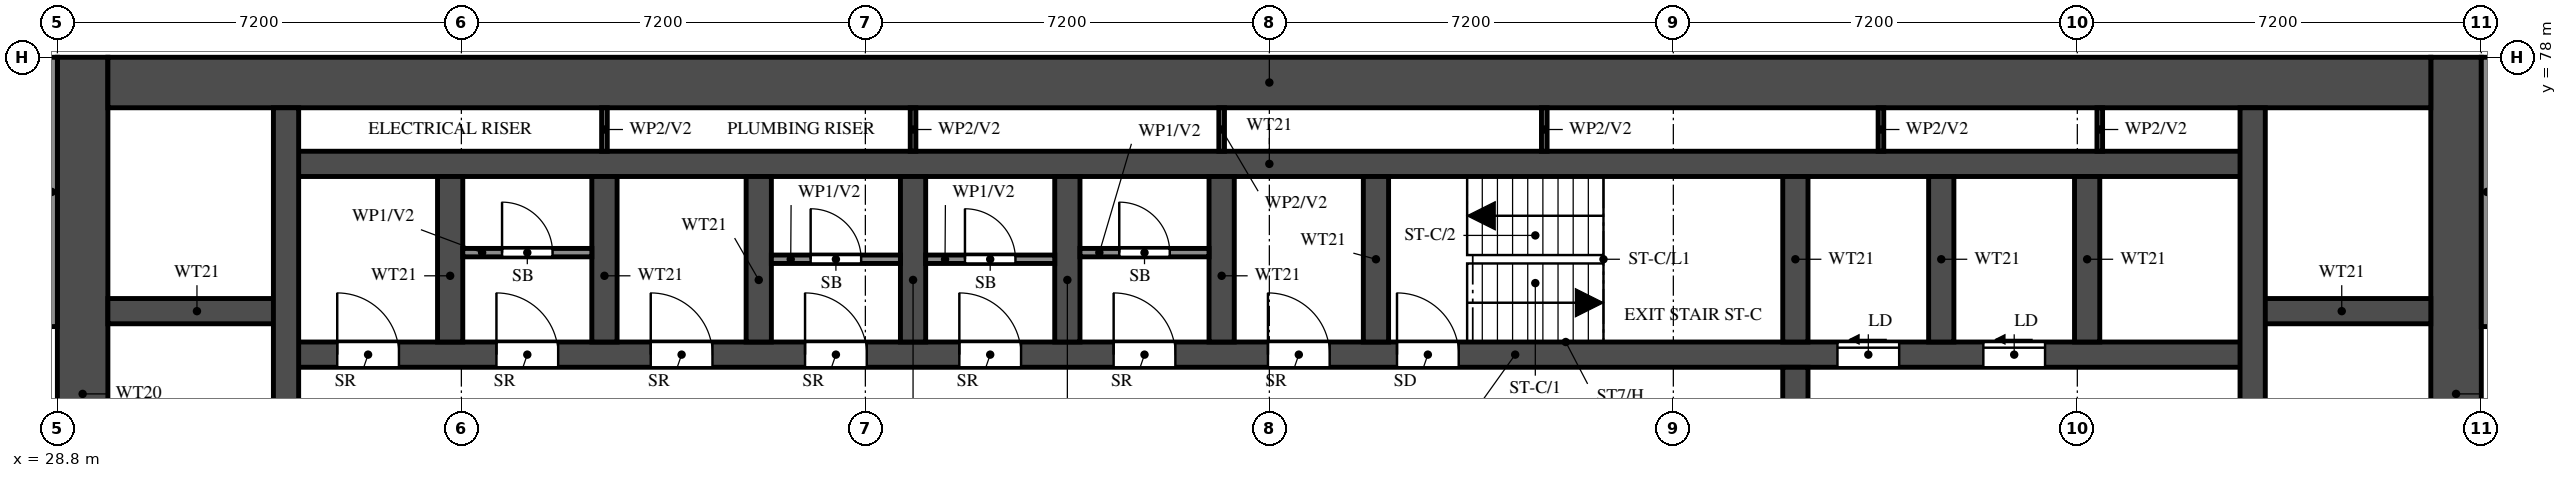
"""IFC4 building model, lengths in metres.
Left out: names, types, materials, properties, quantities, classifications, styles, units other than length and angle.
Written with IfcOpenShell. Run it as: python <this file> out.ifc"""

import sys

from ifc_helpers import new_model, si_unit, direction, frame, frame_2d, origin, place, context, subcontext, project, spatial, rectangle, extrude, element, fill, save


model = new_model("IFC4")
c1 = context("Model", 3, precision=1e-05, world=origin(), true_north=direction((0.0, 1.0)))
c2 = subcontext(c1, "Body", "Model", "MODEL_VIEW")
j1 = project(units=[si_unit("LENGTHUNIT", "METRE"), si_unit("PLANEANGLEUNIT", "RADIAN")], contexts=[c1])
p1 = place(None, origin())
s1 = spatial("IfcSite", under=j1, at=p1, CompositionType="ELEMENT")
p2 = place(p1, origin())
s2 = spatial("IfcBuilding", under=s1, at=p2, CompositionType="ELEMENT")
p3 = place(p2, frame((0.0, 0.0, 34.0)))
s3 = spatial("IfcBuildingStorey", under=s2, at=p3, CompositionType="ELEMENT", Elevation=34.0)
for number, where, z_axis, x_axis in (
    (1, (29.25, 66.0, 0.0), (0.0, 0.0, 1.0), (0.0, 1.0, 0.0)),
    (2, (71.55, 66.0, 0.0), (0.0, 0.0, 1.0), (0.0, 1.0, 0.0)),
):
    element("IfcWall", number, at=place(p3, frame(where, z_axis=z_axis, x_axis=x_axis)), inside=s3, PredefinedType="SHEAR", context=c2, shape_type="SweptSolid", body=[
        extrude(rectangle(XDim=12.0, YDim=0.9, at=frame_2d((6.0, 0.0))), origin(), (0.0, 0.0, 1.0), 3.18),
    ])
p4 = place(p3, frame((29.7, 77.55, 0.0), z_axis=(0.0, 0.0, 1.0), x_axis=(1.0, 0.0, 0.0)))
e3 = element("IfcWall", 3, at=p4, inside=s3, PredefinedType="SHEAR", context=c2, shape_type="SweptSolid", body=[
    extrude(rectangle(XDim=41.4, YDim=0.9, at=frame_2d((20.7, 0.0))), origin(), (0.0, 0.0, 1.0), 3.18),
])
p5 = place(p3, frame((32.875, 72.7, 0.0), z_axis=(0.0, 0.0, 1.0), x_axis=(1.0, 0.0, 0.0)))
e4 = element("IfcWall", 4, at=p5, inside=s3, PredefinedType="SHEAR", context=c2, shape_type="SweptSolid", body=[
    extrude(rectangle(XDim=35.05, YDim=0.45, at=frame_2d((17.525, 0.0))), origin(), (0.0, 0.0, 1.0), 3.18),
])
p6 = place(p5, frame((19.8, 0.0, 0.0)))
e5 = element("IfcOpeningElement", 5, at=p6, cuts=e4, PredefinedType="OPENING", context=c2, shape_type="SweptSolid", body=[
    extrude(rectangle(XDim=1.1, YDim=2.1, at=frame_2d((0.55, 1.05))), frame((0.0, 0.235, 0.0), z_axis=(0.0, -1.0, 0.0), x_axis=(1.0, 0.0, 0.0)), (0.0, 0.0, 1.0), 0.47),
])
p7 = place(p5, frame((27.65, 0.0, 0.0)))
e6 = element("IfcOpeningElement", 6, at=p7, cuts=e4, PredefinedType="OPENING", context=c2, shape_type="SweptSolid", body=[
    extrude(rectangle(XDim=1.1, YDim=2.1, at=frame_2d((0.55, 1.05))), frame((0.0, 0.235, 0.0), z_axis=(0.0, -1.0, 0.0), x_axis=(1.0, 0.0, 0.0)), (0.0, 0.0, 1.0), 0.47),
])
p8 = place(p5, frame((30.25, 0.0, 0.0)))
e7 = element("IfcOpeningElement", 7, at=p8, cuts=e4, PredefinedType="OPENING", context=c2, shape_type="SweptSolid", body=[
    extrude(rectangle(XDim=1.1, YDim=2.1, at=frame_2d((0.55, 1.05))), frame((0.0, 0.235, 0.0), z_axis=(0.0, -1.0, 0.0), x_axis=(1.0, 0.0, 0.0)), (0.0, 0.0, 1.0), 0.47),
])
p9 = place(p5, frame((3.75, 0.0, 0.0)))
e8 = element("IfcOpeningElement", 8, at=p9, cuts=e4, PredefinedType="OPENING", context=c2, shape_type="SweptSolid", body=[
    extrude(rectangle(XDim=1.1, YDim=2.1, at=frame_2d((0.55, 1.05))), frame((0.0, 0.235, 0.0), z_axis=(0.0, -1.0, 0.0), x_axis=(1.0, 0.0, 0.0)), (0.0, 0.0, 1.0), 0.47),
])
p10 = place(p5, frame((6.5, 0.0, 0.0)))
e9 = element("IfcOpeningElement", 9, at=p10, cuts=e4, PredefinedType="OPENING", context=c2, shape_type="SweptSolid", body=[
    extrude(rectangle(XDim=1.1, YDim=2.1, at=frame_2d((0.55, 1.05))), frame((0.0, 0.235, 0.0), z_axis=(0.0, -1.0, 0.0), x_axis=(1.0, 0.0, 0.0)), (0.0, 0.0, 1.0), 0.47),
])
p11 = place(p5, frame((9.25, 0.0, 0.0)))
e10 = element("IfcOpeningElement", 10, at=p11, cuts=e4, PredefinedType="OPENING", context=c2, shape_type="SweptSolid", body=[
    extrude(rectangle(XDim=1.1, YDim=2.1, at=frame_2d((0.55, 1.05))), frame((0.0, 0.235, 0.0), z_axis=(0.0, -1.0, 0.0), x_axis=(1.0, 0.0, 0.0)), (0.0, 0.0, 1.0), 0.47),
])
p12 = place(p5, frame((12.0, 0.0, 0.0)))
e11 = element("IfcOpeningElement", 11, at=p12, cuts=e4, PredefinedType="OPENING", context=c2, shape_type="SweptSolid", body=[
    extrude(rectangle(XDim=1.1, YDim=2.1, at=frame_2d((0.55, 1.05))), frame((0.0, 0.235, 0.0), z_axis=(0.0, -1.0, 0.0), x_axis=(1.0, 0.0, 0.0)), (0.0, 0.0, 1.0), 0.47),
])
p13 = place(p5, frame((14.75, 0.0, 0.0)))
e12 = element("IfcOpeningElement", 12, at=p13, cuts=e4, PredefinedType="OPENING", context=c2, shape_type="SweptSolid", body=[
    extrude(rectangle(XDim=1.1, YDim=2.1, at=frame_2d((0.55, 1.05))), frame((0.0, 0.235, 0.0), z_axis=(0.0, -1.0, 0.0), x_axis=(1.0, 0.0, 0.0)), (0.0, 0.0, 1.0), 0.47),
])
p14 = place(p5, frame((17.5, 0.0, 0.0)))
e13 = element("IfcOpeningElement", 13, at=p14, cuts=e4, PredefinedType="OPENING", context=c2, shape_type="SweptSolid", body=[
    extrude(rectangle(XDim=1.1, YDim=2.1, at=frame_2d((0.55, 1.05))), frame((0.0, 0.235, 0.0), z_axis=(0.0, -1.0, 0.0), x_axis=(1.0, 0.0, 0.0)), (0.0, 0.0, 1.0), 0.47),
])
p15 = place(p5, frame((0.913, 0.0, 0.0)))
e14 = element("IfcOpeningElement", 14, at=p15, cuts=e4, PredefinedType="OPENING", context=c2, shape_type="SweptSolid", body=[
    extrude(rectangle(XDim=1.1, YDim=2.1, at=frame_2d((0.55, 1.05))), frame((0.0, 0.235, 0.0), z_axis=(0.0, -1.0, 0.0), x_axis=(1.0, 0.0, 0.0)), (0.0, 0.0, 1.0), 0.47),
])
p16 = place(p3, frame((32.875, 76.1, 0.0), z_axis=(0.0, 0.0, 1.0), x_axis=(1.0, 0.0, 0.0)))
e15 = element("IfcWall", 15, at=p16, inside=s3, PredefinedType="SHEAR", context=c2, shape_type="SweptSolid", body=[
    extrude(rectangle(XDim=35.05, YDim=0.45, at=frame_2d((17.525, 0.0))), origin(), (0.0, 0.0, 1.0), 3.18),
])
for number, where, z_axis, x_axis in (
    (16, (29.7, 73.475, 0.0), (0.0, 0.0, 1.0), (1.0, 0.0, 0.0)),
    (17, (67.925, 73.475, 0.0), (0.0, 0.0, 1.0), (1.0, 0.0, 0.0)),
):
    element("IfcWall", number, at=place(p3, frame(where, z_axis=z_axis, x_axis=x_axis)), inside=s3, PredefinedType="SHEAR", context=c2, shape_type="SweptSolid", body=[
        extrude(rectangle(XDim=3.175, YDim=0.45, at=frame_2d((1.587, 0.0))), origin(), (0.0, 0.0, 1.0), 3.18),
    ])
p17 = place(p3, frame((32.875, 66.45, 0.0), z_axis=(0.0, 0.0, 1.0), x_axis=(0.0, 1.0, 0.0)))
e18 = element("IfcWall", 18, at=p17, inside=s3, PredefinedType="SHEAR", context=c2, shape_type="SweptSolid", body=[
    extrude(rectangle(XDim=10.65, YDim=0.45, at=frame_2d((5.325, 0.0))), origin(), (0.0, 0.0, 1.0), 3.18),
])
p18 = place(p3, frame((67.925, 66.45, 0.0), z_axis=(0.0, 0.0, 1.0), x_axis=(0.0, 1.0, 0.0)))
e19 = element("IfcWall", 19, at=p18, inside=s3, PredefinedType="SHEAR", context=c2, shape_type="SweptSolid", body=[
    extrude(rectangle(XDim=10.65, YDim=0.45, at=frame_2d((5.325, 0.0))), origin(), (0.0, 0.0, 1.0), 3.18),
])
p19 = place(p18, frame((0.15, 0.0, 0.0)))
e20 = element("IfcOpeningElement", 20, at=p19, cuts=e19, PredefinedType="OPENING", context=c2, shape_type="SweptSolid", body=[
    extrude(rectangle(XDim=1.1, YDim=2.1, at=frame_2d((0.55, 1.05))), frame((0.0, 0.235, 0.0), z_axis=(0.0, -1.0, 0.0), x_axis=(1.0, 0.0, 0.0)), (0.0, 0.0, 1.0), 0.47),
])
p20 = place(p3, frame((59.775, 66.45, 0.0), z_axis=(0.0, 0.0, 1.0), x_axis=(0.0, 1.0, 0.0)))
e21 = element("IfcWall", 21, at=p20, inside=s3, PredefinedType="SHEAR", context=c2, shape_type="SweptSolid", body=[
    extrude(rectangle(XDim=6.025, YDim=0.45, at=frame_2d((3.013, 0.0))), origin(), (0.0, 0.0, 1.0), 3.18),
])
p21 = place(p20, frame((3.85, 0.0, 0.0)))
e22 = element("IfcOpeningElement", 22, at=p21, cuts=e21, PredefinedType="OPENING", context=c2, shape_type="SweptSolid", body=[
    extrude(rectangle(XDim=1.2, YDim=2.1, at=frame_2d((0.6, 1.05))), frame((0.0, 0.235, 0.0), z_axis=(0.0, -1.0, 0.0), x_axis=(1.0, 0.0, 0.0)), (0.0, 0.0, 1.0), 0.47),
])
for number, where, z_axis, x_axis in (
    (23, (59.775, 72.925, 0.0), (0.0, 0.0, 1.0), (0.0, 1.0, 0.0)),
    (24, (35.8, 72.925, 0.0), (0.0, 0.0, 1.0), (0.0, 1.0, 0.0)),
    (25, (38.55, 72.925, 0.0), (0.0, 0.0, 1.0), (0.0, 1.0, 0.0)),
    (26, (41.3, 72.925, 0.0), (0.0, 0.0, 1.0), (0.0, 1.0, 0.0)),
    (27, (44.05, 72.925, 0.0), (0.0, 0.0, 1.0), (0.0, 1.0, 0.0)),
    (28, (46.8, 72.925, 0.0), (0.0, 0.0, 1.0), (0.0, 1.0, 0.0)),
    (29, (49.55, 72.925, 0.0), (0.0, 0.0, 1.0), (0.0, 1.0, 0.0)),
    (30, (52.3, 72.925, 0.0), (0.0, 0.0, 1.0), (0.0, 1.0, 0.0)),
    (31, (62.375, 72.925, 0.0), (0.0, 0.0, 1.0), (0.0, 1.0, 0.0)),
    (32, (64.975, 72.925, 0.0), (0.0, 0.0, 1.0), (0.0, 1.0, 0.0)),
):
    element("IfcWall", number, at=place(p3, frame(where, z_axis=z_axis, x_axis=x_axis)), inside=s3, PredefinedType="SHEAR", context=c2, shape_type="SweptSolid", body=[
        extrude(rectangle(XDim=2.95, YDim=0.45, at=frame_2d((1.475, 0.0))), origin(), (0.0, 0.0, 1.0), 3.18),
    ])
p22 = place(p3, frame((36.025, 74.518, 0.0), z_axis=(0.0, 0.0, 1.0), x_axis=(1.0, 0.0, 0.0)))
e33 = element("IfcWall", 33, at=p22, inside=s3, PredefinedType="PARTITIONING", context=c2, shape_type="SweptSolid", body=[
    extrude(rectangle(XDim=2.3, YDim=0.15, at=frame_2d((1.15, 0.0))), origin(), (0.0, 0.0, 1.0), 3.18),
])
p23 = place(p22, frame((0.7, 0.0, 0.0)))
e34 = element("IfcOpeningElement", 34, at=p23, cuts=e33, PredefinedType="OPENING", context=c2, shape_type="SweptSolid", body=[
    extrude(rectangle(XDim=0.9, YDim=2.1, at=frame_2d((0.45, 1.05))), frame((0.0, 0.085, 0.0), z_axis=(0.0, -1.0, 0.0), x_axis=(1.0, 0.0, 0.0)), (0.0, 0.0, 1.0), 0.17),
])
p24 = place(p3, frame((41.525, 74.4, 0.0), z_axis=(0.0, 0.0, 1.0), x_axis=(1.0, 0.0, 0.0)))
e35 = element("IfcWall", 35, at=p24, inside=s3, PredefinedType="PARTITIONING", context=c2, shape_type="SweptSolid", body=[
    extrude(rectangle(XDim=2.3, YDim=0.15, at=frame_2d((1.15, 0.0))), origin(), (0.0, 0.0, 1.0), 3.18),
])
p25 = place(p24, frame((0.7, 0.0, 0.0)))
e36 = element("IfcOpeningElement", 36, at=p25, cuts=e35, PredefinedType="OPENING", context=c2, shape_type="SweptSolid", body=[
    extrude(rectangle(XDim=0.9, YDim=2.1, at=frame_2d((0.45, 1.05))), frame((0.0, 0.085, 0.0), z_axis=(0.0, -1.0, 0.0), x_axis=(1.0, 0.0, 0.0)), (0.0, 0.0, 1.0), 0.17),
])
p26 = place(p3, frame((44.275, 74.4, 0.0), z_axis=(0.0, 0.0, 1.0), x_axis=(1.0, 0.0, 0.0)))
e37 = element("IfcWall", 37, at=p26, inside=s3, PredefinedType="PARTITIONING", context=c2, shape_type="SweptSolid", body=[
    extrude(rectangle(XDim=2.3, YDim=0.15, at=frame_2d((1.15, 0.0))), origin(), (0.0, 0.0, 1.0), 3.18),
])
p27 = place(p26, frame((0.7, 0.0, 0.0)))
e38 = element("IfcOpeningElement", 38, at=p27, cuts=e37, PredefinedType="OPENING", context=c2, shape_type="SweptSolid", body=[
    extrude(rectangle(XDim=0.9, YDim=2.1, at=frame_2d((0.45, 1.05))), frame((0.0, 0.085, 0.0), z_axis=(0.0, -1.0, 0.0), x_axis=(1.0, 0.0, 0.0)), (0.0, 0.0, 1.0), 0.17),
])
p28 = place(p3, frame((47.025, 74.518, 0.0), z_axis=(0.0, 0.0, 1.0), x_axis=(1.0, 0.0, 0.0)))
e39 = element("IfcWall", 39, at=p28, inside=s3, PredefinedType="PARTITIONING", context=c2, shape_type="SweptSolid", body=[
    extrude(rectangle(XDim=2.3, YDim=0.15, at=frame_2d((1.15, 0.0))), origin(), (0.0, 0.0, 1.0), 3.18),
])
p29 = place(p28, frame((0.7, 0.0, 0.0)))
e40 = element("IfcOpeningElement", 40, at=p29, cuts=e39, PredefinedType="OPENING", context=c2, shape_type="SweptSolid", body=[
    extrude(rectangle(XDim=0.9, YDim=2.1, at=frame_2d((0.45, 1.05))), frame((0.0, 0.085, 0.0), z_axis=(0.0, -1.0, 0.0), x_axis=(1.0, 0.0, 0.0)), (0.0, 0.0, 1.0), 0.17),
])
for number, where, z_axis, x_axis in (
    (41, (38.55, 76.325, 0.0), (0.0, 0.0, 1.0), (0.0, 1.0, 0.0)),
    (42, (44.05, 76.325, 0.0), (0.0, 0.0, 1.0), (0.0, 1.0, 0.0)),
    (43, (49.55, 76.325, 0.0), (0.0, 0.0, 1.0), (0.0, 1.0, 0.0)),
    (44, (55.3, 76.325, 0.0), (0.0, 0.0, 1.0), (0.0, 1.0, 0.0)),
    (45, (61.3, 76.325, 0.0), (0.0, 0.0, 1.0), (0.0, 1.0, 0.0)),
    (46, (65.2, 76.325, 0.0), (0.0, 0.0, 1.0), (0.0, 1.0, 0.0)),
):
    element("IfcWall", number, at=place(p3, frame(where, z_axis=z_axis, x_axis=x_axis)), inside=s3, PredefinedType="PARTITIONING", context=c2, shape_type="SweptSolid", body=[
        extrude(rectangle(XDim=0.775, YDim=0.1, at=frame_2d((0.388, 0.0))), origin(), (0.0, 0.0, 1.0), 3.18),
    ])
for number, where, z_axis, x_axis in (
    (47, (28.7, 73.2, 0.0), (0.0, 0.0, 1.0), (0.0, 1.0, 0.0)),
    (48, (72.1, 73.2, 0.0), (0.0, 0.0, 1.0), (0.0, 1.0, 0.0)),
):
    element("IfcWall", number, at=place(p3, frame(where, z_axis=z_axis, x_axis=x_axis)), inside=s3, PredefinedType="SOLIDWALL", context=c2, shape_type="SweptSolid", body=[
        extrude(rectangle(XDim=4.8, YDim=0.2, at=frame_2d((2.4, 0.0))), origin(), (0.0, 0.0, 1.0), 3.18),
    ])
p30 = place(p6, origin())
e49 = element("IfcDoor", 49, at=p30, inside=s3, OperationType="SINGLE_SWING_LEFT", PredefinedType="DOOR", context=c2, shape_type="SweptSolid", body=[
    extrude(rectangle(XDim=1.1, YDim=2.1, at=frame_2d((0.55, 1.05))), frame((0.0, 0.025, 0.0), z_axis=(0.0, -1.0, 0.0), x_axis=(1.0, 0.0, 0.0)), (0.0, 0.0, 1.0), 0.05),
])
fill(e5, e49)
p31 = place(p7, origin())
e50 = element("IfcDoor", 50, at=p31, inside=s3, OperationType="SLIDING_TO_LEFT", PredefinedType="DOOR", context=c2, shape_type="SweptSolid", body=[
    extrude(rectangle(XDim=1.1, YDim=2.1, at=frame_2d((0.55, 1.05))), frame((0.0, 0.025, 0.0), z_axis=(0.0, -1.0, 0.0), x_axis=(1.0, 0.0, 0.0)), (0.0, 0.0, 1.0), 0.05),
])
fill(e6, e50)
p32 = place(p8, origin())
e51 = element("IfcDoor", 51, at=p32, inside=s3, OperationType="SLIDING_TO_LEFT", PredefinedType="DOOR", context=c2, shape_type="SweptSolid", body=[
    extrude(rectangle(XDim=1.1, YDim=2.1, at=frame_2d((0.55, 1.05))), frame((0.0, 0.025, 0.0), z_axis=(0.0, -1.0, 0.0), x_axis=(1.0, 0.0, 0.0)), (0.0, 0.0, 1.0), 0.05),
])
fill(e7, e51)
p33 = place(p9, origin())
e52 = element("IfcDoor", 52, at=p33, inside=s3, OperationType="SINGLE_SWING_LEFT", PredefinedType="DOOR", context=c2, shape_type="SweptSolid", body=[
    extrude(rectangle(XDim=1.1, YDim=2.1, at=frame_2d((0.55, 1.05))), frame((0.0, 0.025, 0.0), z_axis=(0.0, -1.0, 0.0), x_axis=(1.0, 0.0, 0.0)), (0.0, 0.0, 1.0), 0.05),
])
fill(e8, e52)
p34 = place(p23, origin())
e53 = element("IfcDoor", 53, at=p34, inside=s3, OperationType="SINGLE_SWING_RIGHT", PredefinedType="DOOR", context=c2, shape_type="SweptSolid", body=[
    extrude(rectangle(XDim=0.9, YDim=2.1, at=frame_2d((0.45, 1.05))), frame((0.0, 0.025, 0.0), z_axis=(0.0, -1.0, 0.0), x_axis=(1.0, 0.0, 0.0)), (0.0, 0.0, 1.0), 0.05),
])
fill(e34, e53)
p35 = place(p10, origin())
e54 = element("IfcDoor", 54, at=p35, inside=s3, OperationType="SINGLE_SWING_LEFT", PredefinedType="DOOR", context=c2, shape_type="SweptSolid", body=[
    extrude(rectangle(XDim=1.1, YDim=2.1, at=frame_2d((0.55, 1.05))), frame((0.0, 0.025, 0.0), z_axis=(0.0, -1.0, 0.0), x_axis=(1.0, 0.0, 0.0)), (0.0, 0.0, 1.0), 0.05),
])
fill(e9, e54)
p36 = place(p11, origin())
e55 = element("IfcDoor", 55, at=p36, inside=s3, OperationType="SINGLE_SWING_LEFT", PredefinedType="DOOR", context=c2, shape_type="SweptSolid", body=[
    extrude(rectangle(XDim=1.1, YDim=2.1, at=frame_2d((0.55, 1.05))), frame((0.0, 0.025, 0.0), z_axis=(0.0, -1.0, 0.0), x_axis=(1.0, 0.0, 0.0)), (0.0, 0.0, 1.0), 0.05),
])
fill(e10, e55)
p37 = place(p25, origin())
e56 = element("IfcDoor", 56, at=p37, inside=s3, OperationType="SINGLE_SWING_LEFT", PredefinedType="DOOR", context=c2, shape_type="SweptSolid", body=[
    extrude(rectangle(XDim=0.9, YDim=2.1, at=frame_2d((0.45, 1.05))), frame((0.0, 0.025, 0.0), z_axis=(0.0, -1.0, 0.0), x_axis=(1.0, 0.0, 0.0)), (0.0, 0.0, 1.0), 0.05),
])
fill(e36, e56)
p38 = place(p12, origin())
e57 = element("IfcDoor", 57, at=p38, inside=s3, OperationType="SINGLE_SWING_LEFT", PredefinedType="DOOR", context=c2, shape_type="SweptSolid", body=[
    extrude(rectangle(XDim=1.1, YDim=2.1, at=frame_2d((0.55, 1.05))), frame((0.0, 0.025, 0.0), z_axis=(0.0, -1.0, 0.0), x_axis=(1.0, 0.0, 0.0)), (0.0, 0.0, 1.0), 0.05),
])
fill(e11, e57)
p39 = place(p27, origin())
e58 = element("IfcDoor", 58, at=p39, inside=s3, OperationType="SINGLE_SWING_RIGHT", PredefinedType="DOOR", context=c2, shape_type="SweptSolid", body=[
    extrude(rectangle(XDim=0.9, YDim=2.1, at=frame_2d((0.45, 1.05))), frame((0.0, 0.025, 0.0), z_axis=(0.0, -1.0, 0.0), x_axis=(1.0, 0.0, 0.0)), (0.0, 0.0, 1.0), 0.05),
])
fill(e38, e58)
p40 = place(p13, origin())
e59 = element("IfcDoor", 59, at=p40, inside=s3, OperationType="SINGLE_SWING_LEFT", PredefinedType="DOOR", context=c2, shape_type="SweptSolid", body=[
    extrude(rectangle(XDim=1.1, YDim=2.1, at=frame_2d((0.55, 1.05))), frame((0.0, 0.025, 0.0), z_axis=(0.0, -1.0, 0.0), x_axis=(1.0, 0.0, 0.0)), (0.0, 0.0, 1.0), 0.05),
])
fill(e12, e59)
p41 = place(p29, origin())
e60 = element("IfcDoor", 60, at=p41, inside=s3, OperationType="SINGLE_SWING_RIGHT", PredefinedType="DOOR", context=c2, shape_type="SweptSolid", body=[
    extrude(rectangle(XDim=0.9, YDim=2.1, at=frame_2d((0.45, 1.05))), frame((0.0, 0.025, 0.0), z_axis=(0.0, -1.0, 0.0), x_axis=(1.0, 0.0, 0.0)), (0.0, 0.0, 1.0), 0.05),
])
fill(e40, e60)
p42 = place(p14, origin())
e61 = element("IfcDoor", 61, at=p42, inside=s3, OperationType="SINGLE_SWING_LEFT", PredefinedType="DOOR", context=c2, shape_type="SweptSolid", body=[
    extrude(rectangle(XDim=1.1, YDim=2.1, at=frame_2d((0.55, 1.05))), frame((0.0, 0.025, 0.0), z_axis=(0.0, -1.0, 0.0), x_axis=(1.0, 0.0, 0.0)), (0.0, 0.0, 1.0), 0.05),
])
fill(e13, e61)
p43 = place(p15, origin())
e62 = element("IfcDoor", 62, at=p43, inside=s3, OperationType="SINGLE_SWING_LEFT", PredefinedType="DOOR", context=c2, shape_type="SweptSolid", body=[
    extrude(rectangle(XDim=1.1, YDim=2.1, at=frame_2d((0.55, 1.05))), frame((0.0, 0.025, 0.0), z_axis=(0.0, -1.0, 0.0), x_axis=(1.0, 0.0, 0.0)), (0.0, 0.0, 1.0), 0.05),
])
fill(e14, e62)
save(model, sys.argv[1])
